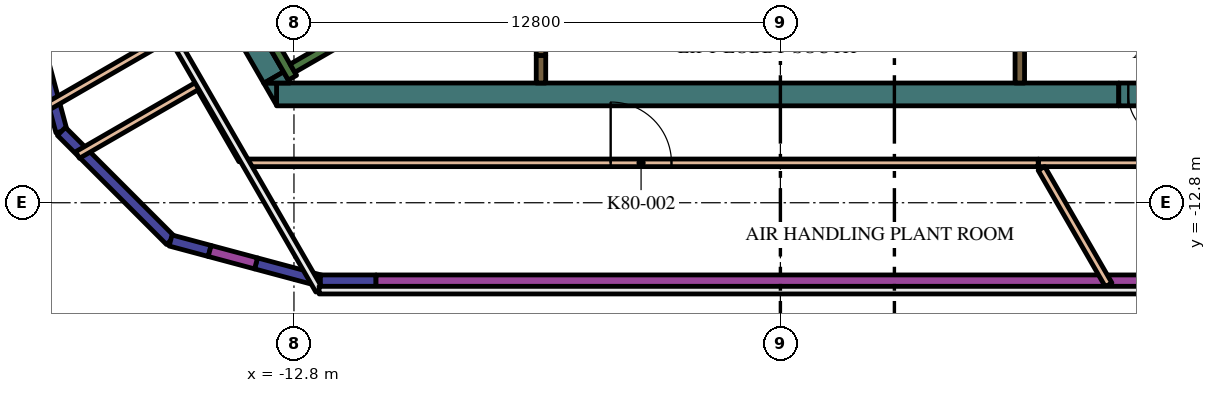
"""IFC4 building model, lengths in metres.
Left out: names, types, materials, properties, quantities, classifications, styles, units other than length and angle.
Written with IfcOpenShell. Run it as: python <this file> out.ifc"""

import sys

from ifc_helpers import new_model, si_unit, direction, frame, frame_2d, origin, origin_2d, place, context, subcontext, project, spatial, polyline, rectangle, outline, extrude, element, fill, save


model = new_model("IFC4")
c1 = context("Model", 3, precision=1e-05, world=origin(), true_north=direction((0.0, 1.0)))
c2 = subcontext(c1, "Body", "Model", "MODEL_VIEW")
j1 = project(units=[si_unit("LENGTHUNIT", "METRE"), si_unit("PLANEANGLEUNIT", "RADIAN")], contexts=[c1])
p1 = place(None, origin())
s1 = spatial("IfcSite", under=j1, at=p1, CompositionType="ELEMENT")
p2 = place(p1, origin())
s2 = spatial("IfcBuilding", under=s1, at=p2, CompositionType="ELEMENT")
p3 = place(p2, frame((0.0, 0.0, 344.4)))
s3 = spatial("IfcBuildingStorey", under=s2, at=p3, CompositionType="ELEMENT", Elevation=344.4)
p4 = place(p3, frame((8.904, -9.95, 0.0), z_axis=(0.0, 0.0, 1.0), x_axis=(-1.0, 0.0, 0.0)))
e1 = element("IfcWall", 1, at=p4, inside=s3, PredefinedType="SOLIDWALL", context=c2, shape_type="SweptSolid", body=[
    extrude(rectangle(XDim=22.161, YDim=0.6, at=frame_2d((11.081, 0.0))), origin(), (0.0, 0.0, 1.0), 4.2),
])
p5 = place(p3, origin())
e2 = element("IfcWall", 2, at=p5, inside=s3, PredefinedType="SOLIDWALL", context=c2, shape_type="SweptSolid", body=[
    extrude(outline(polyline([(-13.597, -9.65), (-13.259, -9.65), (-13.259, -10.236), (-13.597, -9.65)])), origin(), (0.0, 0.0, 1.0), 4.2),
])
p6 = place(p3, frame((-13.333, -9.506, 0.0), z_axis=(0.0, 0.0, 1.0), x_axis=(-0.500019073792, 0.866014391245, 0.0)))
e3 = element("IfcWall", 3, at=p6, inside=s3, PredefinedType="SOLIDWALL", context=c2, shape_type="SweptSolid", body=[
    extrude(rectangle(XDim=3.823, YDim=0.6, at=frame_2d((1.912, 0.0))), origin(), (0.0, 0.0, 1.0), 4.2),
])
e4 = element("IfcWall", 4, at=p5, inside=s3, PredefinedType="SOLIDWALL", context=c2, shape_type="SweptSolid", body=[
    extrude(outline(polyline([(-12.904, -9.65), (-13.58, -9.65), (-13.073, -9.357), (-12.904, -9.65)])), origin(), (0.0, 0.0, 1.0), 4.2),
])
p7 = place(p3, frame((12.84, -9.261, 0.0), z_axis=(0.0, 0.0, 1.0), x_axis=(-0.866013990052, 0.500019768644, 0.0)))
e5 = element("IfcWall", 5, at=p7, inside=s3, PredefinedType="SOLIDWALL", context=c2, shape_type="SweptSolid", body=[
    extrude(rectangle(XDim=6.8, YDim=0.25, at=frame_2d((3.4, 0.0))), origin(), (0.0, 0.0, 1.0), 4.2),
])
p8 = place(p3, frame((-12.84, -9.511, 0.0), z_axis=(0.0, 0.0, 1.0), x_axis=(-0.499997733992, 0.866026712061, 0.0)))
e6 = element("IfcWall", 6, at=p8, inside=s3, PredefinedType="SOLIDWALL", context=c2, shape_type="SweptSolid", body=[
    extrude(rectangle(XDim=3.634, YDim=0.25, at=frame_2d((1.817, 0.0))), origin(), (0.0, 0.0, 1.0), 4.2),
])
p9 = place(p3, frame((-12.84, -9.261, 0.0), z_axis=(0.0, 0.0, 1.0), x_axis=(0.866016039709, 0.500016218704, 0.0)))
e7 = element("IfcWall", 7, at=p9, inside=s3, PredefinedType="SOLIDWALL", context=c2, shape_type="SweptSolid", body=[
    extrude(rectangle(XDim=7.05, YDim=0.25, at=frame_2d((3.525, 0.0))), origin(), (0.0, 0.0, 1.0), 4.2),
])
p10 = place(p3, frame((6.3, -9.65, 0.0), z_axis=(0.0, 0.0, 1.0), x_axis=(0.0, 1.0, 0.0)))
e8 = element("IfcWall", 8, at=p10, inside=s3, PredefinedType="SOLIDWALL", context=c2, shape_type="SweptSolid", body=[
    extrude(rectangle(XDim=1.008, YDim=0.25, at=frame_2d((0.504, 0.0))), origin(), (0.0, 0.0, 1.0), 4.2),
])
p11 = place(p3, frame((-6.3, -8.925, 0.0), z_axis=(0.0, 0.0, 1.0), x_axis=(0.0, -1.0, 0.0)))
e9 = element("IfcWall", 9, at=p11, inside=s3, PredefinedType="SOLIDWALL", context=c2, shape_type="SweptSolid", body=[
    extrude(rectangle(XDim=0.725, YDim=0.25, at=frame_2d((0.363, 0.0))), origin(), (0.0, 0.0, 1.0), 4.2),
])
p12 = place(p3, frame((-6.3, -7.125, 0.0), z_axis=(0.0, 0.0, 1.0), x_axis=(0.0, -1.0, 0.0)))
e10 = element("IfcWall", 10, at=p12, inside=s3, PredefinedType="SOLIDWALL", context=c2, shape_type="SweptSolid", body=[
    extrude(rectangle(XDim=1.8, YDim=0.25, at=frame_2d((0.9, 0.0))), origin(), (0.0, 0.0, 1.0), 4.2),
])
p13 = place(p12, frame((0.45, 0.0, 0.0)))
e11 = element("IfcOpeningElement", 11, at=p13, cuts=e10, PredefinedType="OPENING", context=c2, shape_type="SweptSolid", body=[
    extrude(rectangle(XDim=0.9, YDim=2.1, at=frame_2d((0.45, 1.05))), frame((0.0, 0.135, 0.0), z_axis=(0.0, -1.0, 0.0), x_axis=(1.0, 0.0, 0.0)), (0.0, 0.0, 1.0), 0.27),
])
p14 = place(p3, frame((10.604, -9.95, 0.0), z_axis=(0.0, 0.0, 1.0), x_axis=(-1.0, 0.0, 0.0)))
e12 = element("IfcWall", 12, at=p14, inside=s3, PredefinedType="SOLIDWALL", context=c2, shape_type="SweptSolid", body=[
    extrude(rectangle(XDim=1.7, YDim=0.6, at=frame_2d((0.85, 0.0))), origin(), (0.0, 0.0, 1.0), 4.2),
])
p15 = place(p14, frame((0.25, 0.0, 0.0)))
e13 = element("IfcOpeningElement", 13, at=p15, cuts=e12, PredefinedType="OPENING", context=c2, shape_type="SweptSolid", body=[
    extrude(rectangle(XDim=1.2, YDim=2.1, at=frame_2d((0.6, 1.05))), frame((0.0, 0.31, 0.0), z_axis=(0.0, -1.0, 0.0), x_axis=(1.0, 0.0, 0.0)), (0.0, 0.0, 1.0), 0.62),
])
p16 = place(p3, frame((-14.116, -11.75, 0.0), z_axis=(0.0, 0.0, 1.0), x_axis=(1.0, 0.0, 0.0)))
e14 = element("IfcWall", 14, at=p16, inside=s3, PredefinedType="PARTITIONING", context=c2, shape_type="SweptSolid", body=[
    extrude(rectangle(XDim=20.9, YDim=0.2, at=frame_2d((10.45, 0.0))), origin(), (0.0, 0.0, 1.0), 3.3),
])
p17 = place(p16, frame((9.65, 0.0, 0.0)))
e15 = element("IfcOpeningElement", 15, at=p17, cuts=e14, PredefinedType="OPENING", context=c2, shape_type="SweptSolid", body=[
    extrude(rectangle(XDim=1.6, YDim=2.1, at=frame_2d((0.8, 1.05))), frame((0.0, 0.11, 0.0), z_axis=(0.0, -1.0, 0.0), x_axis=(1.0, 0.0, 0.0)), (0.0, 0.0, 1.0), 0.22),
])
p18 = place(p3, frame((6.794, -11.75, 0.0), z_axis=(0.0, 0.0, 1.0), x_axis=(1.0, 0.0, 0.0)))
e16 = element("IfcWall", 16, at=p18, inside=s3, PredefinedType="PARTITIONING", context=c2, shape_type="SweptSolid", body=[
    extrude(rectangle(XDim=7.323, YDim=0.2, at=frame_2d((3.661, 0.0))), origin(), (0.0, 0.0, 1.0), 3.3),
])
p19 = place(p18, frame((3.061, 0.0, 0.0)))
e17 = element("IfcOpeningElement", 17, at=p19, cuts=e16, PredefinedType="OPENING", context=c2, shape_type="SweptSolid", body=[
    extrude(rectangle(XDim=1.2, YDim=2.1, at=frame_2d((0.6, 1.05))), frame((0.0, 0.11, 0.0), z_axis=(0.0, -1.0, 0.0), x_axis=(1.0, 0.0, 0.0)), (0.0, 0.0, 1.0), 0.22),
])
p20 = place(p3, frame((6.869, -11.897, 0.0), z_axis=(0.0, 0.0, 1.0), x_axis=(0.499985409597, -0.866033827394, 0.0)))
e18 = element("IfcWall", 18, at=p20, inside=s3, PredefinedType="PARTITIONING", context=c2, shape_type="SweptSolid", body=[
    extrude(rectangle(XDim=3.536, YDim=0.2, at=frame_2d((1.768, 0.0))), origin(), (0.0, 0.0, 1.0), 3.3),
])
for number, where, z_axis, x_axis in (
    (19, (-19.244, -10.245, 0.0), (0.0, 0.0, 1.0), (0.866, 0.5, 0.0)),
    (20, (-15.3, -9.699, 0.0), (0.0, 0.0, 1.0), (-0.866, -0.5, 0.0)),
):
    element("IfcWall", number, at=place(p3, frame(where, z_axis=z_axis, x_axis=x_axis)), inside=s3, PredefinedType="PARTITIONING", context=c2, shape_type="SweptSolid", body=[
        extrude(rectangle(XDim=3.688, YDim=0.2, at=frame_2d((1.844, 0.0))), origin(), (0.0, 0.0, 1.0), 3.3),
    ])
p21 = place(p3, frame((-14.161, -11.672, 0.0), z_axis=(0.0, 0.0, 1.0), x_axis=(-0.499997407846, 0.86602690036, 0.0)))
e21 = element("IfcWall", 21, at=p21, inside=s3, PredefinedType="PARTITIONING", context=c2, shape_type="SweptSolid", body=[
    extrude(rectangle(XDim=2.178, YDim=0.2, at=frame_2d((1.089, 0.0))), origin(), (0.0, 0.0, 1.0), 3.3),
])
for number, where, z_axis, x_axis in (
    (22, (-19.969, -7.0, 0.0), (0.0, 0.0, 1.0), (0.259, -0.966, 0.0)),
    (23, (-18.918, -10.922, 0.0), (0.0, 0.0, 1.0), (0.707, -0.707, 0.0)),
):
    element("IfcWall", number, at=place(p3, frame(where, z_axis=z_axis, x_axis=x_axis)), inside=s3, PredefinedType="SOLIDWALL", context=c2, shape_type="SweptSolid", body=[
        extrude(rectangle(XDim=4.061, YDim=0.3, at=frame_2d((2.03, 0.0))), origin(), (0.0, 0.0, 1.0), 3.8),
    ])
p22 = place(p3, frame((-16.047, -13.794, 0.0), z_axis=(0.0, 0.0, 1.0), x_axis=(0.965918371587, -0.258846864828, 0.0)))
e24 = element("IfcWall", 24, at=p22, inside=s3, PredefinedType="SOLIDWALL", context=c2, shape_type="SweptSolid", body=[
    extrude(rectangle(XDim=1.065, YDim=0.3, at=frame_2d((0.532, 0.0))), origin(), (0.0, 0.0, 1.0), 3.8),
])
p23 = place(p3, frame((-15.018, -14.069, 0.0), z_axis=(0.0, 0.0, 1.0), x_axis=(0.965926498018, -0.258816538161, 0.0)))
e25 = element("IfcWall", 25, at=p23, inside=s3, PredefinedType="SOLIDWALL", context=c2, shape_type="SweptSolid", body=[
    extrude(rectangle(XDim=1.264, YDim=0.3, at=frame_2d((0.632, 0.0))), origin(), (0.0, 0.0, 1.0), 3.3),
])
p24 = place(p3, frame((-13.797, -14.396, 0.0), z_axis=(0.0, 0.0, 1.0), x_axis=(0.965915089044, -0.258859113723, 0.0)))
e26 = element("IfcWall", 26, at=p24, inside=s3, PredefinedType="SOLIDWALL", context=c2, shape_type="SweptSolid", body=[
    extrude(rectangle(XDim=1.752, YDim=0.3, at=frame_2d((0.876, 0.0))), origin(), (0.0, 0.0, 1.0), 3.8),
])
p25 = place(p3, frame((-12.105, -14.85, 0.0), z_axis=(0.0, 0.0, 1.0), x_axis=(1.0, 0.0, 0.0)))
e27 = element("IfcWall", 27, at=p25, inside=s3, PredefinedType="SOLIDWALL", context=c2, shape_type="SweptSolid", body=[
    extrude(rectangle(XDim=1.464, YDim=0.3, at=frame_2d((0.732, 0.0))), origin(), (0.0, 0.0, 1.0), 3.8),
])
p26 = place(p3, frame((-10.641, -14.85, 0.0), z_axis=(0.0, 0.0, 1.0), x_axis=(1.0, 0.0, 0.0)))
e28 = element("IfcWall", 28, at=p26, inside=s3, PredefinedType="SOLIDWALL", context=c2, shape_type="SweptSolid", body=[
    extrude(rectangle(XDim=21.282, YDim=0.3, at=frame_2d((10.641, 0.0))), origin(), (0.0, 0.0, 1.0), 3.3),
])
p27 = place(p15, origin())
e29 = element("IfcDoor", 29, at=p27, inside=s3, OperationType="SINGLE_SWING_LEFT", PredefinedType="DOOR", context=c2, shape_type="SweptSolid", body=[
    extrude(rectangle(XDim=1.2, YDim=2.1, at=frame_2d((0.6, 1.05))), frame((0.0, 0.025, 0.0), z_axis=(0.0, -1.0, 0.0), x_axis=(1.0, 0.0, 0.0)), (0.0, 0.0, 1.0), 0.05),
])
fill(e13, e29)
p28 = place(p17, origin())
e30 = element("IfcDoor", 30, at=p28, inside=s3, OperationType="DOUBLE_DOOR_SINGLE_SWING", PredefinedType="DOOR", context=c2, shape_type="SweptSolid", body=[
    extrude(rectangle(XDim=1.6, YDim=2.1, at=frame_2d((0.8, 1.05))), frame((0.0, 0.025, 0.0), z_axis=(0.0, -1.0, 0.0), x_axis=(1.0, 0.0, 0.0)), (0.0, 0.0, 1.0), 0.05),
])
fill(e15, e30)
p29 = place(p2, frame((0.0, 0.0, 348.6)))
p30 = place(p29, origin())
p31 = place(p30, frame((10.695, -6.175, 0.0)))
p32 = place(p31, frame((0.0, 0.0, 1.15)))
e31 = element("IfcWindow", 31, at=p32, inside=s3, PartitioningType="SINGLE_PANEL", PredefinedType="WINDOW", context=c2, shape_type="SweptSolid", body=[
    extrude(rectangle(XDim=7.364, YDim=5.955, at=origin_2d()), origin(), (0.0, 0.0, 1.0), 0.05),
])
p33 = place(p30, frame((-10.695, -6.175, 0.0)))
p34 = place(p33, frame((0.0, 0.0, 1.15)))
e32 = element("IfcWindow", 32, at=p34, inside=s3, PartitioningType="SINGLE_PANEL", PredefinedType="WINDOW", context=c2, shape_type="SweptSolid", body=[
    extrude(rectangle(XDim=7.364, YDim=5.955, at=origin_2d()), origin(), (0.0, 0.0, 1.0), 0.05),
])
save(model, sys.argv[1])
